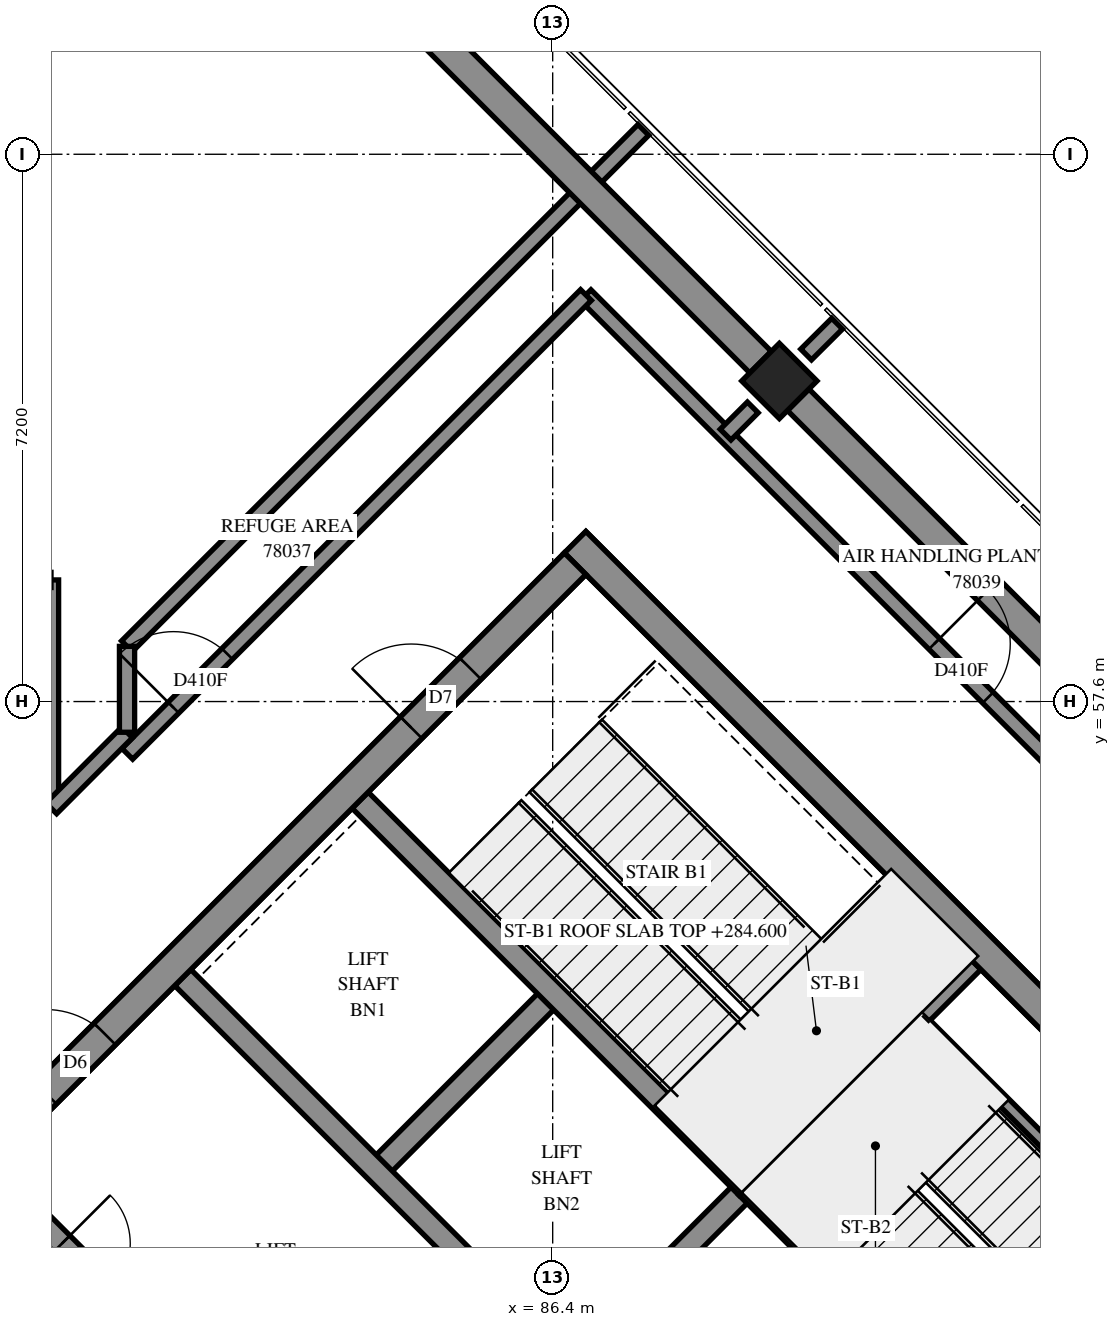
"""IFC4 building model, lengths in metres.
Left out: names, types, materials, properties, quantities, classifications, styles, units other than length and angle.
Written with IfcOpenShell. Run it as: python <this file> out.ifc"""

import sys

from ifc_helpers import new_model, si_unit, direction, frame, frame_2d, origin, origin_2d, place, context, subcontext, project, spatial, rectangle, extrude, element, fill, save


model = new_model("IFC4")
c1 = context("Model", 3, precision=1e-05, world=origin(), true_north=direction((0.0, 1.0)))
c2 = subcontext(c1, "Body", "Model", "MODEL_VIEW")
j1 = project(units=[si_unit("LENGTHUNIT", "METRE"), si_unit("PLANEANGLEUNIT", "RADIAN")], contexts=[c1])
p1 = place(None, origin())
s1 = spatial("IfcSite", under=j1, at=p1, CompositionType="ELEMENT")
p2 = place(p1, origin())
s2 = spatial("IfcBuilding", under=s1, at=p2, CompositionType="ELEMENT")
p3 = place(p2, frame((0.0, 0.0, 284.6)))
s3 = spatial("IfcBuildingStorey", under=s2, at=p3, CompositionType="ELEMENT", Elevation=284.6)
p4 = place(p3, frame((89.382, 61.818, 0.0), z_axis=(0.0, 0.0, 1.0), x_axis=(0.7071067812, -0.7071067812, 0.0)))
e1 = element("IfcColumn", 1, at=p4, inside=s3, PredefinedType="COLUMN", context=c2, shape_type="SweptSolid", body=[
    extrude(rectangle(XDim=0.7, YDim=0.7, at=origin_2d()), origin(), (0.0, 0.0, 1.0), 5.7),
])
p5 = place(p3, frame((86.695, 59.696, -0.3), z_axis=(0.0, 0.0, 1.0), x_axis=(0.7071100706, -0.7071034917, 0.0)))
e2 = element("IfcWall", 2, at=p5, inside=s3, PredefinedType="SHEAR", context=c2, shape_type="SweptSolid", body=[
    extrude(rectangle(XDim=15.2, YDim=0.4, at=frame_2d((7.6, 0.0))), origin(), (0.0, 0.0, 1.0), 5.3),
])
p6 = place(p5, frame((10.4, 0.0, 0.3)))
e3 = element("IfcOpeningElement", 3, at=p6, cuts=e2, PredefinedType="OPENING", context=c2, shape_type="SweptSolid", body=[
    extrude(rectangle(XDim=0.8, YDim=2.1, at=frame_2d((0.4, 1.05))), frame((0.0, 0.21, 0.0), z_axis=(0.0, -1.0, 0.0), x_axis=(1.0, 0.0, 0.0)), (0.0, 0.0, 1.0), 0.42),
])
p7 = place(p3, frame((76.513, 49.231, -0.3), z_axis=(0.0, 0.0, 1.0), x_axis=(0.7071067812, 0.7071067812, 0.0)))
e4 = element("IfcWall", 4, at=p7, inside=s3, PredefinedType="SHEAR", context=c2, shape_type="SweptSolid", body=[
    extrude(rectangle(XDim=14.4, YDim=0.4, at=frame_2d((7.2, 0.0))), origin(), (0.0, 0.0, 1.0), 5.3),
])
p8 = place(p7, frame((4.55, 0.0, 0.3)))
e5 = element("IfcOpeningElement", 5, at=p8, cuts=e4, PredefinedType="OPENING", context=c2, shape_type="SweptSolid", body=[
    extrude(rectangle(XDim=1.1, YDim=2.1, at=frame_2d((0.55, 1.05))), frame((0.0, 0.21, 0.0), z_axis=(0.0, -1.0, 0.0), x_axis=(1.0, 0.0, 0.0)), (0.0, 0.0, 1.0), 0.42),
])
p9 = place(p7, frame((11.35, 0.0, 0.3)))
e6 = element("IfcOpeningElement", 6, at=p9, cuts=e4, PredefinedType="OPENING", context=c2, shape_type="SweptSolid", body=[
    extrude(rectangle(XDim=1.1, YDim=2.1, at=frame_2d((0.55, 1.05))), frame((0.0, 0.21, 0.0), z_axis=(0.0, -1.0, 0.0), x_axis=(1.0, 0.0, 0.0)), (0.0, 0.0, 1.0), 0.42),
])
p10 = place(p3, frame((84.079, 51.423, 0.0), z_axis=(0.0, 0.0, 1.0), x_axis=(0.7071219326, 0.7070916295, 0.0)))
e7 = element("IfcWall", 7, at=p10, inside=s3, PredefinedType="SOLIDWALL", context=c2, shape_type="SweptSolid", body=[
    extrude(rectangle(XDim=3.3, YDim=0.3, at=frame_2d((1.65, 0.0))), origin(), (0.0, 0.0, 1.0), 5.7),
])
p11 = place(p3, frame((86.625, 48.878, 0.0), z_axis=(0.0, 0.0, 1.0), x_axis=(0.7071067812, 0.7071067812, 0.0)))
e8 = element("IfcWall", 8, at=p11, inside=s3, PredefinedType="SOLIDWALL", context=c2, shape_type="SweptSolid", body=[
    extrude(rectangle(XDim=3.3, YDim=0.3, at=frame_2d((1.65, 0.0))), origin(), (0.0, 0.0, 1.0), 5.7),
])
p12 = place(p3, frame((78.988, 51.423, 0.0), z_axis=(0.0, 0.0, 1.0), x_axis=(0.7071067812, -0.7071067812, 0.0)))
e9 = element("IfcWall", 9, at=p12, inside=s3, PredefinedType="SOLIDWALL", context=c2, shape_type="SweptSolid", body=[
    extrude(rectangle(XDim=14.4, YDim=0.3, at=frame_2d((7.2, 0.0))), origin(), (0.0, 0.0, 1.0), 5.7),
])
p13 = place(p12, frame((1.35, 0.0, 0.0)))
e10 = element("IfcOpeningElement", 10, at=p13, cuts=e9, PredefinedType="OPENING", context=c2, shape_type="SweptSolid", body=[
    extrude(rectangle(XDim=0.9, YDim=2.1, at=frame_2d((0.45, 1.05))), frame((0.0, 0.16, 0.0), z_axis=(0.0, -1.0, 0.0), x_axis=(1.0, 0.0, 0.0)), (0.0, 0.0, 1.0), 0.32),
])
p14 = place(p12, frame((4.95, 0.0, 0.0)))
e11 = element("IfcOpeningElement", 11, at=p14, cuts=e9, PredefinedType="OPENING", context=c2, shape_type="SweptSolid", body=[
    extrude(rectangle(XDim=0.9, YDim=2.1, at=frame_2d((0.45, 1.05))), frame((0.0, 0.16, 0.0), z_axis=(0.0, -1.0, 0.0), x_axis=(1.0, 0.0, 0.0)), (0.0, 0.0, 1.0), 0.32),
])
p15 = place(p12, frame((8.55, 0.0, 0.0)))
e12 = element("IfcOpeningElement", 12, at=p15, cuts=e9, PredefinedType="OPENING", context=c2, shape_type="SweptSolid", body=[
    extrude(rectangle(XDim=0.9, YDim=2.1, at=frame_2d((0.45, 1.05))), frame((0.0, 0.16, 0.0), z_axis=(0.0, -1.0, 0.0), x_axis=(1.0, 0.0, 0.0)), (0.0, 0.0, 1.0), 0.32),
])
p16 = place(p12, frame((12.05, 0.0, 0.0)))
e13 = element("IfcOpeningElement", 13, at=p16, cuts=e9, PredefinedType="OPENING", context=c2, shape_type="SweptSolid", body=[
    extrude(rectangle(XDim=1.1, YDim=2.1, at=frame_2d((0.55, 1.05))), frame((0.0, 0.16, 0.0), z_axis=(0.0, -1.0, 0.0), x_axis=(1.0, 0.0, 0.0)), (0.0, 0.0, 1.0), 0.32),
])
p17 = place(p3, frame((81.534, 53.969, 0.0), z_axis=(0.0, 0.0, 1.0), x_axis=(0.707103309, -0.7071102534, 0.0)))
e14 = element("IfcWall", 14, at=p17, inside=s3, PredefinedType="SOLIDWALL", context=c2, shape_type="SweptSolid", body=[
    extrude(rectangle(XDim=14.4, YDim=0.3, at=frame_2d((7.2, 0.0))), origin(), (0.0, 0.0, 1.0), 5.7),
])
p18 = place(p17, frame((8.55, 0.0, 0.0)))
e15 = element("IfcOpeningElement", 15, at=p18, cuts=e14, PredefinedType="OPENING", context=c2, shape_type="SweptSolid", body=[
    extrude(rectangle(XDim=0.9, YDim=2.1, at=frame_2d((0.45, 1.05))), frame((0.0, 0.16, 0.0), z_axis=(0.0, -1.0, 0.0), x_axis=(1.0, 0.0, 0.0)), (0.0, 0.0, 1.0), 0.32),
])
p19 = place(p17, frame((12.05, 0.0, 0.0)))
e16 = element("IfcOpeningElement", 16, at=p19, cuts=e14, PredefinedType="OPENING", context=c2, shape_type="SweptSolid", body=[
    extrude(rectangle(XDim=1.1, YDim=2.1, at=frame_2d((0.55, 1.05))), frame((0.0, 0.16, 0.0), z_axis=(0.0, -1.0, 0.0), x_axis=(1.0, 0.0, 0.0)), (0.0, 0.0, 1.0), 0.32),
])
for number, where, z_axis, x_axis in (
    (17, (83.867, 56.302, 0.0), (0.0, 0.0, 1.0), (0.707, -0.707, 0.0)),
    (18, (88.958, 51.211, 0.0), (0.0, 0.0, 1.0), (0.707, -0.707, 0.0)),
):
    element("IfcWall", number, at=place(p3, frame(where, z_axis=z_axis, x_axis=x_axis)), inside=s3, PredefinedType="SOLIDWALL", context=c2, shape_type="SweptSolid", body=[
        extrude(rectangle(XDim=7.2, YDim=0.3, at=frame_2d((3.6, 0.0))), origin(), (0.0, 0.0, 1.0), 5.7),
    ])
p20 = place(p3, frame((88.958, 51.211, 0.0), z_axis=(0.0, 0.0, 1.0), x_axis=(0.7071067812, 0.7071067812, 0.0)))
e19 = element("IfcWall", 19, at=p20, inside=s3, PredefinedType="SOLIDWALL", context=c2, shape_type="SweptSolid", body=[
    extrude(rectangle(XDim=4.2, YDim=0.3, at=frame_2d((2.1, 0.0))), origin(), (0.0, 0.0, 1.0), 5.7),
])
p21 = place(p3, frame((91.313, 53.354, 0.0), z_axis=(0.0, 0.0, 1.0), x_axis=(0.7071140275, -0.7070995348, 0.0)))
e20 = element("IfcWall", 20, at=p21, inside=s3, PredefinedType="PARTITIONING", context=c2, shape_type="SweptSolid", body=[
    extrude(rectangle(XDim=6.9, YDim=0.15, at=frame_2d((3.45, 0.0))), origin(), (0.0, 0.0, 1.0), 5.7),
])
p22 = place(p3, frame((86.833, 62.947, 0.0), z_axis=(0.0, 0.0, 1.0), x_axis=(0.7071067812, -0.7071067812, 0.0)))
e21 = element("IfcWall", 21, at=p22, inside=s3, PredefinedType="PARTITIONING", context=c2, shape_type="SweptSolid", body=[
    extrude(rectangle(XDim=19.601, YDim=0.2, at=frame_2d((9.8, 0.0))), origin(), (0.0, 0.0, 1.0), 5.7),
])
p23 = place(p22, frame((6.487, 0.0, 0.0)))
e22 = element("IfcOpeningElement", 22, at=p23, cuts=e21, PredefinedType="OPENING", context=c2, shape_type="SweptSolid", body=[
    extrude(rectangle(XDim=1.0, YDim=2.1, at=frame_2d((0.5, 1.05))), frame((0.0, 0.11, 0.0), z_axis=(0.0, -1.0, 0.0), x_axis=(1.0, 0.0, 0.0)), (0.0, 0.0, 1.0), 0.22),
])
p24 = place(p22, frame((13.688, 0.0, 0.0)))
e23 = element("IfcOpeningElement", 23, at=p24, cuts=e21, PredefinedType="OPENING", context=c2, shape_type="SweptSolid", body=[
    extrude(rectangle(XDim=1.0, YDim=2.1, at=frame_2d((0.5, 1.05))), frame((0.0, 0.11, 0.0), z_axis=(0.0, -1.0, 0.0), x_axis=(1.0, 0.0, 0.0)), (0.0, 0.0, 1.0), 0.22),
])
p25 = place(p3, frame((80.799, 58.327, 0.0), z_axis=(0.0, 0.0, 1.0), x_axis=(0.7071067812, 0.7071067812, 0.0)))
e24 = element("IfcWall", 24, at=p25, inside=s3, PredefinedType="PARTITIONING", context=c2, shape_type="SweptSolid", body=[
    extrude(rectangle(XDim=9.608, YDim=0.2, at=frame_2d((4.804, 0.0))), origin(), (0.0, 0.0, 1.0), 5.7),
])
p26 = place(p3, frame((80.804, 56.912, 0.0), z_axis=(0.0, 0.0, 1.0), x_axis=(0.7069896038, 0.7072239391, 0.0)))
e25 = element("IfcWall", 25, at=p26, inside=s3, PredefinedType="PARTITIONING", context=c2, shape_type="SweptSolid", body=[
    extrude(rectangle(XDim=8.535, YDim=0.2, at=frame_2d((4.267, 0.0))), origin(), (0.0, 0.0, 1.0), 5.7),
])
p27 = place(p26, frame((0.859, 0.0, 0.0)))
e26 = element("IfcOpeningElement", 26, at=p27, cuts=e25, PredefinedType="OPENING", context=c2, shape_type="SweptSolid", body=[
    extrude(rectangle(XDim=1.0, YDim=2.1, at=frame_2d((0.5, 1.05))), frame((0.0, 0.11, 0.0), z_axis=(0.0, -1.0, 0.0), x_axis=(1.0, 0.0, 0.0)), (0.0, 0.0, 1.0), 0.22),
])
p28 = place(p3, frame((79.8, 56.198, 0.0), z_axis=(0.0, 0.0, 1.0), x_axis=(0.0, 1.0, 0.0)))
e27 = element("IfcWall", 27, at=p28, inside=s3, PredefinedType="PARTITIONING", context=c2, shape_type="SweptSolid", body=[
    extrude(rectangle(XDim=3.002, YDim=0.2, at=frame_2d((1.501, 0.0))), origin(), (0.0, 0.0, 1.0), 5.7),
])
p29 = place(p3, frame((79.803, 56.195, 0.0), z_axis=(0.0, 0.0, 1.0), x_axis=(0.7063986127, 0.7078142412, 0.0)))
e28 = element("IfcWall", 28, at=p29, inside=s3, PredefinedType="PARTITIONING", context=c2, shape_type="SweptSolid", body=[
    extrude(rectangle(XDim=1.413, YDim=0.2, at=frame_2d((0.706, 0.0))), origin(), (0.0, 0.0, 1.0), 5.7),
])
p30 = place(p3, frame((80.8, 57.196, 0.0), z_axis=(0.0, 0.0, 1.0), x_axis=(0.0, 1.0, 0.0)))
e29 = element("IfcWall", 29, at=p30, inside=s3, PredefinedType="PARTITIONING", context=c2, shape_type="SweptSolid", body=[
    extrude(rectangle(XDim=1.13, YDim=0.2, at=frame_2d((0.565, 0.0))), origin(), (0.0, 0.0, 1.0), 5.7),
])
p31 = place(p3, frame((89.734, 62.166, 0.0), z_axis=(0.0, 0.0, 1.0), x_axis=(0.7088420047, 0.705367289, 0.0)))
e30 = element("IfcWall", 30, at=p31, inside=s3, PredefinedType="PARTITIONING", context=c2, shape_type="SweptSolid", body=[
    extrude(rectangle(XDim=0.576, YDim=0.2, at=frame_2d((0.288, 0.0))), origin(), (0.0, 0.0, 1.0), 5.7),
])
p32 = place(p3, frame((88.674, 61.111, 0.0), z_axis=(0.0, 0.0, 1.0), x_axis=(0.7071067812, 0.7071067812, 0.0)))
e31 = element("IfcWall", 31, at=p32, inside=s3, PredefinedType="PARTITIONING", context=c2, shape_type="SweptSolid", body=[
    extrude(rectangle(XDim=0.506, YDim=0.2, at=frame_2d((0.253, 0.0))), origin(), (0.0, 0.0, 1.0), 5.7),
])
p33 = place(p8, origin())
e32 = element("IfcDoor", 32, at=p33, inside=s3, OperationType="DOUBLE_DOOR_SINGLE_SWING", PredefinedType="DOOR", context=c2, shape_type="SweptSolid", body=[
    extrude(rectangle(XDim=1.1, YDim=2.1, at=frame_2d((0.55, 1.05))), frame((0.0, 0.025, 0.0), z_axis=(0.0, -1.0, 0.0), x_axis=(1.0, 0.0, 0.0)), (0.0, 0.0, 1.0), 0.05),
])
fill(e5, e32)
p34 = place(p9, origin())
e33 = element("IfcDoor", 33, at=p34, inside=s3, OperationType="SINGLE_SWING_LEFT", PredefinedType="DOOR", context=c2, shape_type="SweptSolid", body=[
    extrude(rectangle(XDim=1.1, YDim=2.1, at=frame_2d((0.55, 1.05))), frame((0.0, 0.025, 0.0), z_axis=(0.0, -1.0, 0.0), x_axis=(1.0, 0.0, 0.0)), (0.0, 0.0, 1.0), 0.05),
])
fill(e6, e33)
p35 = place(p13, origin())
e34 = element("IfcDoor", 34, at=p35, inside=s3, OperationType="SINGLE_SWING_LEFT", PredefinedType="DOOR", context=c2, shape_type="SweptSolid", body=[
    extrude(rectangle(XDim=0.9, YDim=2.1, at=frame_2d((0.45, 1.05))), frame((0.0, 0.025, 0.0), z_axis=(0.0, -1.0, 0.0), x_axis=(1.0, 0.0, 0.0)), (0.0, 0.0, 1.0), 0.05),
])
fill(e10, e34)
p36 = place(p27, origin())
e35 = element("IfcDoor", 35, at=p36, inside=s3, OperationType="SINGLE_SWING_RIGHT", PredefinedType="DOOR", context=c2, shape_type="SweptSolid", body=[
    extrude(rectangle(XDim=1.0, YDim=2.1, at=frame_2d((0.5, 1.05))), frame((0.0, 0.025, 0.0), z_axis=(0.0, -1.0, 0.0), x_axis=(1.0, 0.0, 0.0)), (0.0, 0.0, 1.0), 0.05),
])
fill(e26, e35)
p37 = place(p23, origin())
e36 = element("IfcDoor", 36, at=p37, inside=s3, OperationType="SINGLE_SWING_LEFT", PredefinedType="DOOR", context=c2, shape_type="SweptSolid", body=[
    extrude(rectangle(XDim=1.0, YDim=2.1, at=frame_2d((0.5, 1.05))), frame((0.0, 0.025, 0.0), z_axis=(0.0, -1.0, 0.0), x_axis=(1.0, 0.0, 0.0)), (0.0, 0.0, 1.0), 0.05),
])
fill(e22, e36)
save(model, sys.argv[1])
